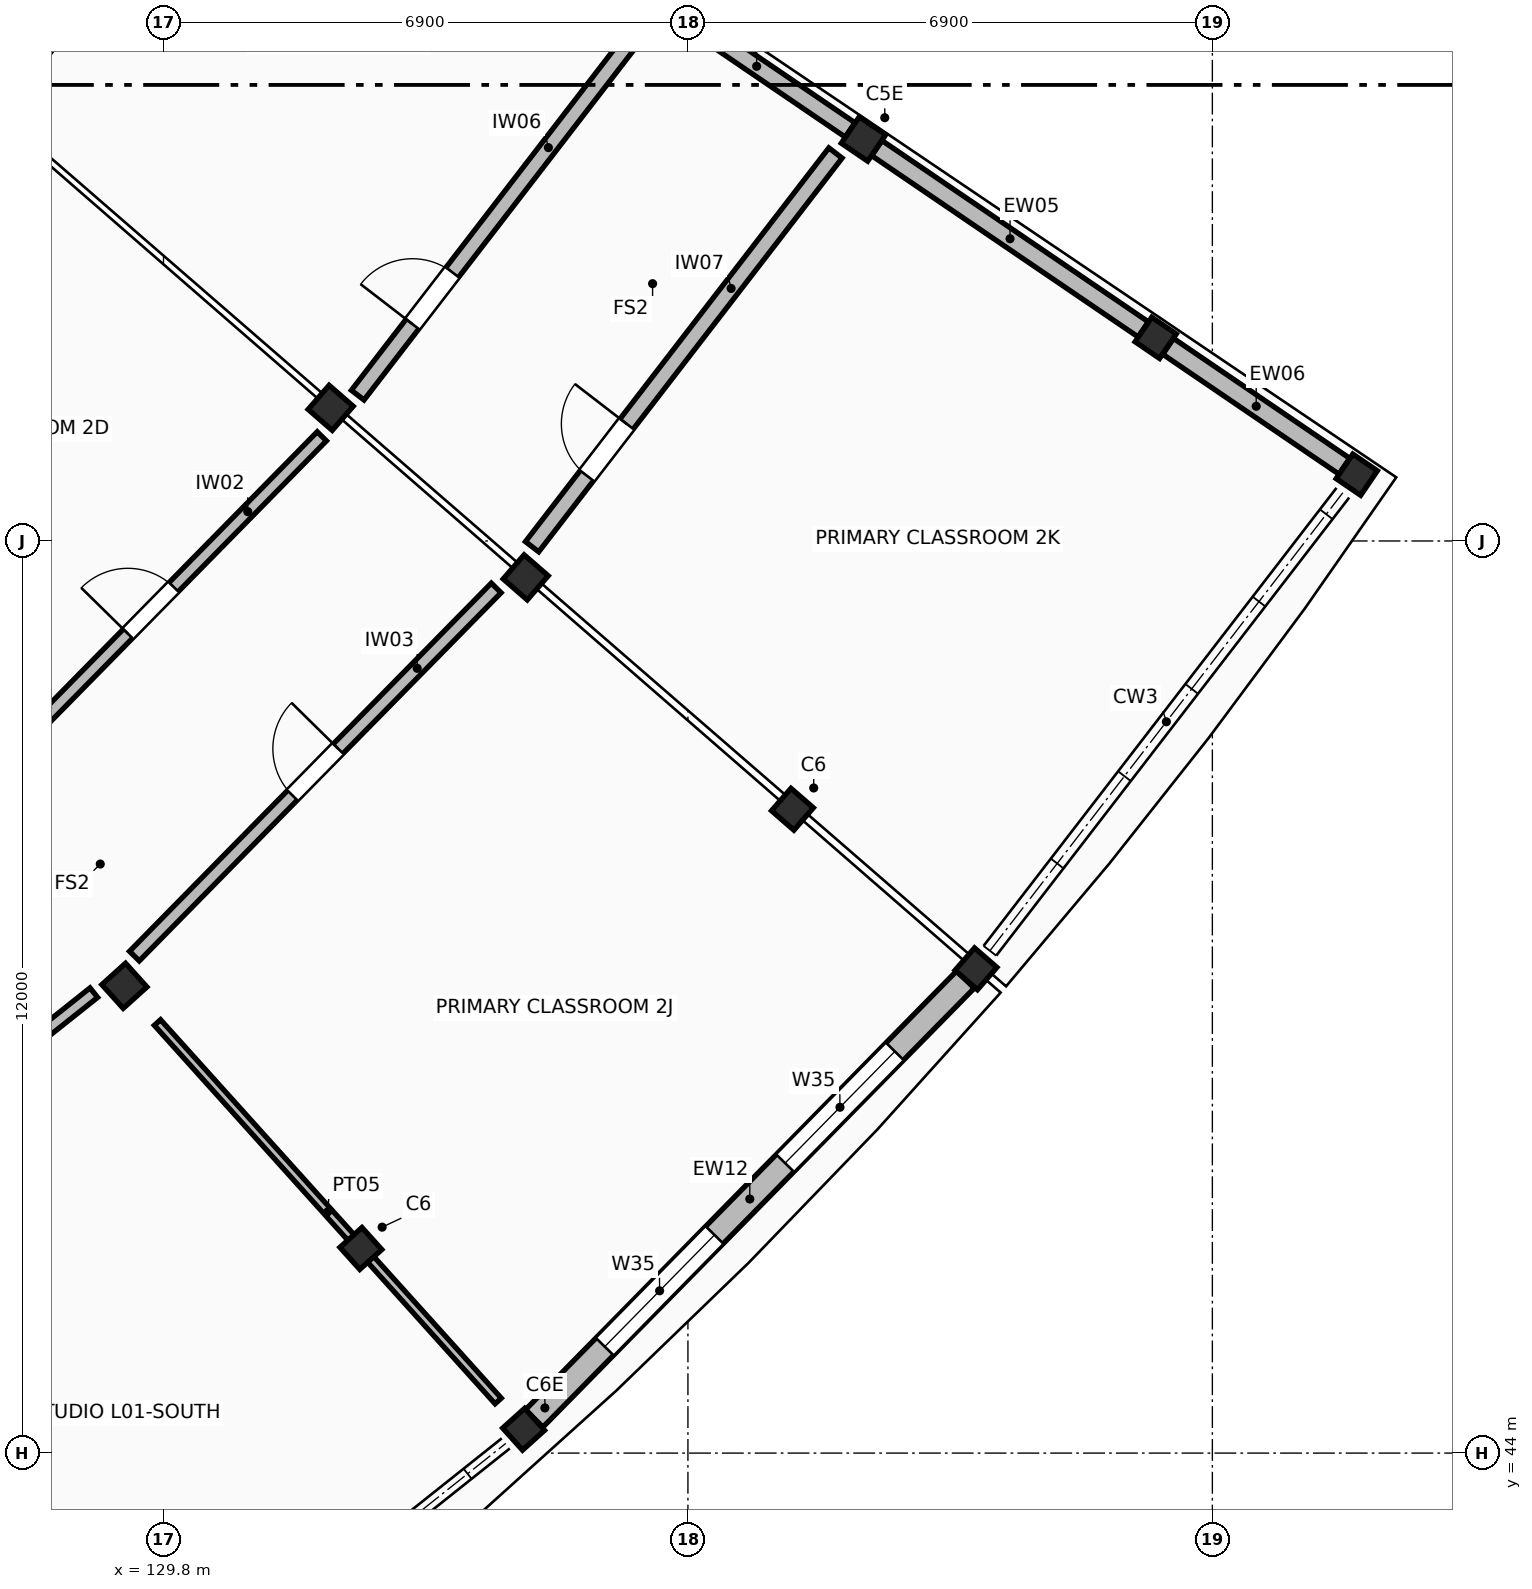
"""IFC4 building model, lengths in metres.
Left out: names, types, materials, properties, quantities, classifications, styles, units other than length and angle.
Written with IfcOpenShell. Run it as: python <this file> out.ifc"""

import sys

from ifc_helpers import new_model, si_unit, direction, frame, frame_2d, origin, origin_2d, place, context, subcontext, project, spatial, rectangle, extrude, element, fill, save


model = new_model("IFC4")
c1 = context("Model", 3, precision=1e-05, world=origin(), true_north=direction((0.0, 1.0)))
c2 = subcontext(c1, "Body", "Model", "MODEL_VIEW")
j1 = project(units=[si_unit("LENGTHUNIT", "METRE"), si_unit("PLANEANGLEUNIT", "RADIAN")], contexts=[c1])
p1 = place(None, origin())
s1 = spatial("IfcSite", under=j1, at=p1, CompositionType="ELEMENT")
p2 = place(p1, origin())
s2 = spatial("IfcBuilding", under=s1, at=p2, CompositionType="ELEMENT")
p3 = place(p2, frame((0.0, 0.0, 4.42)))
s3 = spatial("IfcBuildingStorey", under=s2, at=p3, CompositionType="ELEMENT", Elevation=4.42)
p4 = place(p3, frame((129.285, 50.148, 0.0), z_axis=(0.0, 0.0, 1.0), x_axis=(0.669130606359, -0.743144825477, 0.0)))
e1 = element("IfcColumn", 1, at=p4, inside=s3, PredefinedType="COLUMN", context=c2, shape_type="SweptSolid", body=[
    extrude(rectangle(XDim=0.42, YDim=0.42, at=origin_2d()), origin(), (0.0, 0.0, 1.0), 3.74),
])
for number, where, z_axis, x_axis in (
    (2, (132.397, 46.692, 0.0), (0.0, 0.0, 1.0), (0.669, -0.743, 0.0)),
    (3, (134.538, 44.314, 0.0), (0.0, 0.0, 1.0), (0.669, -0.743, 0.0)),
):
    element("IfcColumn", number, at=place(p3, frame(where, z_axis=z_axis, x_axis=x_axis)), inside=s3, PredefinedType="COLUMN", context=c2, shape_type="SweptSolid", body=[
        extrude(rectangle(XDim=0.39, YDim=0.39, at=origin_2d()), origin(), (0.0, 0.0, 1.0), 3.74),
    ])
for number, where, z_axis, x_axis in (
    (4, (132.0, 57.752, 0.0), (0.0, 0.0, 1.0), (0.755, -0.656, 0.0)),
    (5, (134.566, 55.521, 0.0), (0.0, 0.0, 1.0), (0.755, -0.656, 0.0)),
):
    element("IfcColumn", number, at=place(p3, frame(where, z_axis=z_axis, x_axis=x_axis)), inside=s3, PredefinedType="COLUMN", context=c2, shape_type="SweptSolid", body=[
        extrude(rectangle(XDim=0.42, YDim=0.42, at=origin_2d()), origin(), (0.0, 0.0, 1.0), 3.74),
    ])
for number, where, z_axis, x_axis in (
    (6, (138.075, 52.47, 0.0), (0.0, 0.0, 1.0), (0.755, -0.656, 0.0)),
    (7, (140.49, 50.371, 0.0), (0.0, 0.0, 1.0), (0.755, -0.656, 0.0)),
):
    element("IfcColumn", number, at=place(p3, frame(where, z_axis=z_axis, x_axis=x_axis)), inside=s3, PredefinedType="COLUMN", context=c2, shape_type="SweptSolid", body=[
        extrude(rectangle(XDim=0.39, YDim=0.39, at=origin_2d()), origin(), (0.0, 0.0, 1.0), 3.74),
    ])
p5 = place(p3, frame((139.01, 61.288, 0.0), z_axis=(0.0, 0.0, 1.0), x_axis=(0.826786154745, -0.562516359159, 0.0)))
e8 = element("IfcColumn", 8, at=p5, inside=s3, PredefinedType="COLUMN", context=c2, shape_type="SweptSolid", body=[
    extrude(rectangle(XDim=0.42, YDim=0.42, at=origin_2d()), origin(), (0.0, 0.0, 1.0), 3.74),
])
for number, where, z_axis, x_axis in (
    (9, (142.854, 58.672, 0.0), (0.0, 0.0, 1.0), (0.827, -0.563, 0.0)),
    (10, (145.5, 56.872, 0.0), (0.0, 0.0, 1.0), (0.827, -0.563, 0.0)),
):
    element("IfcColumn", number, at=place(p3, frame(where, z_axis=z_axis, x_axis=x_axis)), inside=s3, PredefinedType="COLUMN", context=c2, shape_type="SweptSolid", body=[
        extrude(rectangle(XDim=0.39, YDim=0.39, at=origin_2d()), origin(), (0.0, 0.0, 1.0), 3.74),
    ])
p6 = place(p3, frame((134.677, 44.456, 0.0), z_axis=(0.0, 0.0, 1.0), x_axis=(0.70091301262, 0.713246765671, 0.0)))
e11 = element("IfcWall", 11, at=p6, inside=s3, PredefinedType="STANDARD", context=c2, shape_type="SweptSolid", body=[
    extrude(rectangle(XDim=8.096, YDim=0.324, at=frame_2d((4.048, 0.0))), origin(), (0.0, 0.0, 1.0), 2.78),
])
p7 = place(p6, frame((1.325, 0.0, 0.95)))
e12 = element("IfcOpeningElement", 12, at=p7, cuts=e11, PredefinedType="OPENING", context=c2, shape_type="SweptSolid", body=[
    extrude(rectangle(XDim=2.06, YDim=1.45, at=frame_2d((1.03, 0.725))), frame((0.0, 0.172, 0.0), z_axis=(0.0, -1.0, 0.0), x_axis=(1.0, 0.0, 0.0)), (0.0, 0.0, 1.0), 0.344),
])
p8 = place(p6, frame((4.711, 0.0, 0.95)))
e13 = element("IfcOpeningElement", 13, at=p8, cuts=e11, PredefinedType="OPENING", context=c2, shape_type="SweptSolid", body=[
    extrude(rectangle(XDim=2.06, YDim=1.45, at=frame_2d((1.03, 0.725))), frame((0.0, 0.172, 0.0), z_axis=(0.0, -1.0, 0.0), x_axis=(1.0, 0.0, 0.0)), (0.0, 0.0, 1.0), 0.344),
])
p9 = place(p3, frame((136.375, 63.081, 0.0), z_axis=(0.0, 0.0, 1.0), x_axis=(0.826746288828, -0.562574949592, 0.0)))
e14 = element("IfcWall", 14, at=p9, inside=s3, PredefinedType="STANDARD", context=c2, shape_type="SweptSolid", body=[
    extrude(rectangle(XDim=2.974, YDim=0.228, at=frame_2d((1.487, 0.0))), origin(), (0.0, 0.0, 1.0), 2.78),
])
p10 = place(p3, frame((139.186, 61.169, 0.0), z_axis=(0.0, 0.0, 1.0), x_axis=(0.826749711991, -0.562569918964, 0.0)))
e15 = element("IfcWall", 15, at=p10, inside=s3, PredefinedType="STANDARD", context=c2, shape_type="SweptSolid", body=[
    extrude(rectangle(XDim=4.239, YDim=0.24, at=frame_2d((2.12, 0.0))), origin(), (0.0, 0.0, 1.0), 2.78),
])
p11 = place(p3, frame((143.018, 58.561, 0.0), z_axis=(0.0, 0.0, 1.0), x_axis=(0.826748315521, -0.562571971204, 0.0)))
e16 = element("IfcWall", 16, at=p11, inside=s3, PredefinedType="STANDARD", context=c2, shape_type="SweptSolid", body=[
    extrude(rectangle(XDim=2.804, YDim=0.252, at=frame_2d((1.402, 0.0))), origin(), (0.0, 0.0, 1.0), 2.78),
])
p12 = place(p3, frame((123.568, 45.83, 0.0), z_axis=(0.0, 0.0, 1.0), x_axis=(0.782615780998, 0.622505051653, 0.0)))
e17 = element("IfcWall", 17, at=p12, inside=s3, PredefinedType="STANDARD", context=c2, shape_type="SweptSolid", body=[
    extrude(rectangle(XDim=6.792, YDim=0.16, at=frame_2d((3.396, 0.0))), origin(), (0.0, 0.0, 1.0), 2.75),
])
p13 = place(p12, frame((2.886, 0.0, 0.0)))
e18 = element("IfcOpeningElement", 18, at=p13, cuts=e17, PredefinedType="OPENING", context=c2, shape_type="SweptSolid", body=[
    extrude(rectangle(XDim=1.02, YDim=2.24, at=frame_2d((0.51, 1.12))), frame((0.0, 0.09, 0.0), z_axis=(0.0, -1.0, 0.0), x_axis=(1.0, 0.0, 0.0)), (0.0, 0.0, 1.0), 0.18),
])
p14 = place(p3, frame((127.383, 52.798, 0.0), z_axis=(0.0, 0.0, 1.0), x_axis=(0.700900509406, 0.713259052459, 0.0)))
e19 = element("IfcWall", 19, at=p14, inside=s3, PredefinedType="STANDARD", context=c2, shape_type="SweptSolid", body=[
    extrude(rectangle(XDim=6.42, YDim=0.17, at=frame_2d((3.21, 0.0))), origin(), (0.0, 0.0, 1.0), 2.75),
])
p15 = place(p14, frame((2.78, 0.0, 0.0)))
e20 = element("IfcOpeningElement", 20, at=p15, cuts=e19, PredefinedType="OPENING", context=c2, shape_type="SweptSolid", body=[
    extrude(rectangle(XDim=0.86, YDim=2.06, at=frame_2d((0.43, 1.03))), frame((0.0, 0.095, 0.0), z_axis=(0.0, -1.0, 0.0), x_axis=(1.0, 0.0, 0.0)), (0.0, 0.0, 1.0), 0.19),
])
p16 = place(p3, frame((129.417, 50.539, 0.0), z_axis=(0.0, 0.0, 1.0), x_axis=(0.700914816473, 0.713244993006, 0.0)))
e21 = element("IfcWall", 21, at=p16, inside=s3, PredefinedType="STANDARD", context=c2, shape_type="SweptSolid", body=[
    extrude(rectangle(XDim=6.792, YDim=0.18, at=frame_2d((3.396, 0.0))), origin(), (0.0, 0.0, 1.0), 2.75),
])
p17 = place(p16, frame((2.966, 0.0, 0.0)))
e22 = element("IfcOpeningElement", 22, at=p17, cuts=e21, PredefinedType="OPENING", context=c2, shape_type="SweptSolid", body=[
    extrude(rectangle(XDim=0.86, YDim=2.12, at=frame_2d((0.43, 1.06))), frame((0.0, 0.1, 0.0), z_axis=(0.0, -1.0, 0.0), x_axis=(1.0, 0.0, 0.0)), (0.0, 0.0, 1.0), 0.2),
])
p18 = place(p3, frame((129.72, 49.665, 0.0), z_axis=(0.0, 0.0, 1.0), x_axis=(0.669115705072, -0.743158242386, 0.0)))
e23 = element("IfcWall", 23, at=p18, inside=s3, PredefinedType="PARTITIONING", context=c2, shape_type="SweptSolid", body=[
    extrude(rectangle(XDim=6.7, YDim=0.11, at=frame_2d((3.35, 0.0))), origin(), (0.0, 0.0, 1.0), 2.75),
])
p19 = place(p3, frame((132.355, 57.919, 0.0), z_axis=(0.0, 0.0, 1.0), x_axis=(0.610376740954, 0.79211125109, 0.0)))
e24 = element("IfcWall", 24, at=p19, inside=s3, PredefinedType="STANDARD", context=c2, shape_type="SweptSolid", body=[
    extrude(rectangle(XDim=6.181, YDim=0.21, at=frame_2d((3.09, 0.0))), origin(), (0.0, 0.0, 1.0), 2.75),
])
p20 = place(p19, frame((1.18, 0.0, 0.0)))
e25 = element("IfcOpeningElement", 25, at=p20, cuts=e24, PredefinedType="OPENING", context=c2, shape_type="SweptSolid", body=[
    extrude(rectangle(XDim=0.86, YDim=2.18, at=frame_2d((0.43, 1.09))), frame((0.0, 0.115, 0.0), z_axis=(0.0, -1.0, 0.0), x_axis=(1.0, 0.0, 0.0)), (0.0, 0.0, 1.0), 0.23),
])
p21 = place(p3, frame((134.649, 55.924, 0.0), z_axis=(0.0, 0.0, 1.0), x_axis=(0.610378079511, 0.792110219637, 0.0)))
e26 = element("IfcWall", 26, at=p21, inside=s3, PredefinedType="STANDARD", context=c2, shape_type="SweptSolid", body=[
    extrude(rectangle(XDim=6.54, YDim=0.22, at=frame_2d((3.27, 0.0))), origin(), (0.0, 0.0, 1.0), 2.75),
])
p22 = place(p21, frame((1.18, 0.0, 0.0)))
e27 = element("IfcOpeningElement", 27, at=p22, cuts=e26, PredefinedType="OPENING", context=c2, shape_type="SweptSolid", body=[
    extrude(rectangle(XDim=0.86, YDim=2.24, at=frame_2d((0.43, 1.12))), frame((0.0, 0.12, 0.0), z_axis=(0.0, -1.0, 0.0), x_axis=(1.0, 0.0, 0.0)), (0.0, 0.0, 1.0), 0.24),
])
p23 = place(p7, origin())
e28 = element("IfcWindow", 28, at=p23, inside=s3, PartitioningType="SINGLE_PANEL", PredefinedType="WINDOW", context=c2, shape_type="SweptSolid", body=[
    extrude(rectangle(XDim=2.06, YDim=1.45, at=frame_2d((1.03, 0.725))), frame((0.0, 0.03, 0.0), z_axis=(0.0, -1.0, 0.0), x_axis=(1.0, 0.0, 0.0)), (0.0, 0.0, 1.0), 0.06),
])
fill(e12, e28)
p24 = place(p8, origin())
e29 = element("IfcWindow", 29, at=p24, inside=s3, PartitioningType="SINGLE_PANEL", PredefinedType="WINDOW", context=c2, shape_type="SweptSolid", body=[
    extrude(rectangle(XDim=2.06, YDim=1.45, at=frame_2d((1.03, 0.725))), frame((0.0, 0.03, 0.0), z_axis=(0.0, -1.0, 0.0), x_axis=(1.0, 0.0, 0.0)), (0.0, 0.0, 1.0), 0.06),
])
fill(e13, e29)
p25 = place(p15, frame((0.86, 0.0, 0.0), z_axis=(0.0, 0.0, 1.0), x_axis=(-1.0, 0.0, 0.0)))
e30 = element("IfcDoor", 30, at=p25, inside=s3, OperationType="SINGLE_SWING_LEFT", PredefinedType="DOOR", context=c2, shape_type="SweptSolid", body=[
    extrude(rectangle(XDim=0.86, YDim=2.06, at=frame_2d((0.43, 1.03))), frame((0.0, 0.025, 0.0), z_axis=(0.0, -1.0, 0.0), x_axis=(1.0, 0.0, 0.0)), (0.0, 0.0, 1.0), 0.05),
])
fill(e20, e30)
p26 = place(p17, origin())
e31 = element("IfcDoor", 31, at=p26, inside=s3, OperationType="SINGLE_SWING_RIGHT", PredefinedType="DOOR", context=c2, shape_type="SweptSolid", body=[
    extrude(rectangle(XDim=0.86, YDim=2.12, at=frame_2d((0.43, 1.06))), frame((0.0, 0.025, 0.0), z_axis=(0.0, -1.0, 0.0), x_axis=(1.0, 0.0, 0.0)), (0.0, 0.0, 1.0), 0.05),
])
fill(e22, e31)
p27 = place(p20, frame((0.86, 0.0, 0.0), z_axis=(0.0, 0.0, 1.0), x_axis=(-1.0, 0.0, 0.0)))
e32 = element("IfcDoor", 32, at=p27, inside=s3, OperationType="SINGLE_SWING_LEFT", PredefinedType="DOOR", context=c2, shape_type="SweptSolid", body=[
    extrude(rectangle(XDim=0.86, YDim=2.18, at=frame_2d((0.43, 1.09))), frame((0.0, 0.025, 0.0), z_axis=(0.0, -1.0, 0.0), x_axis=(1.0, 0.0, 0.0)), (0.0, 0.0, 1.0), 0.05),
])
fill(e25, e32)
p28 = place(p22, origin())
e33 = element("IfcDoor", 33, at=p28, inside=s3, OperationType="SINGLE_SWING_RIGHT", PredefinedType="DOOR", context=c2, shape_type="SweptSolid", body=[
    extrude(rectangle(XDim=0.86, YDim=2.24, at=frame_2d((0.43, 1.12))), frame((0.0, 0.025, 0.0), z_axis=(0.0, -1.0, 0.0), x_axis=(1.0, 0.0, 0.0)), (0.0, 0.0, 1.0), 0.05),
])
fill(e27, e33)
save(model, sys.argv[1])
